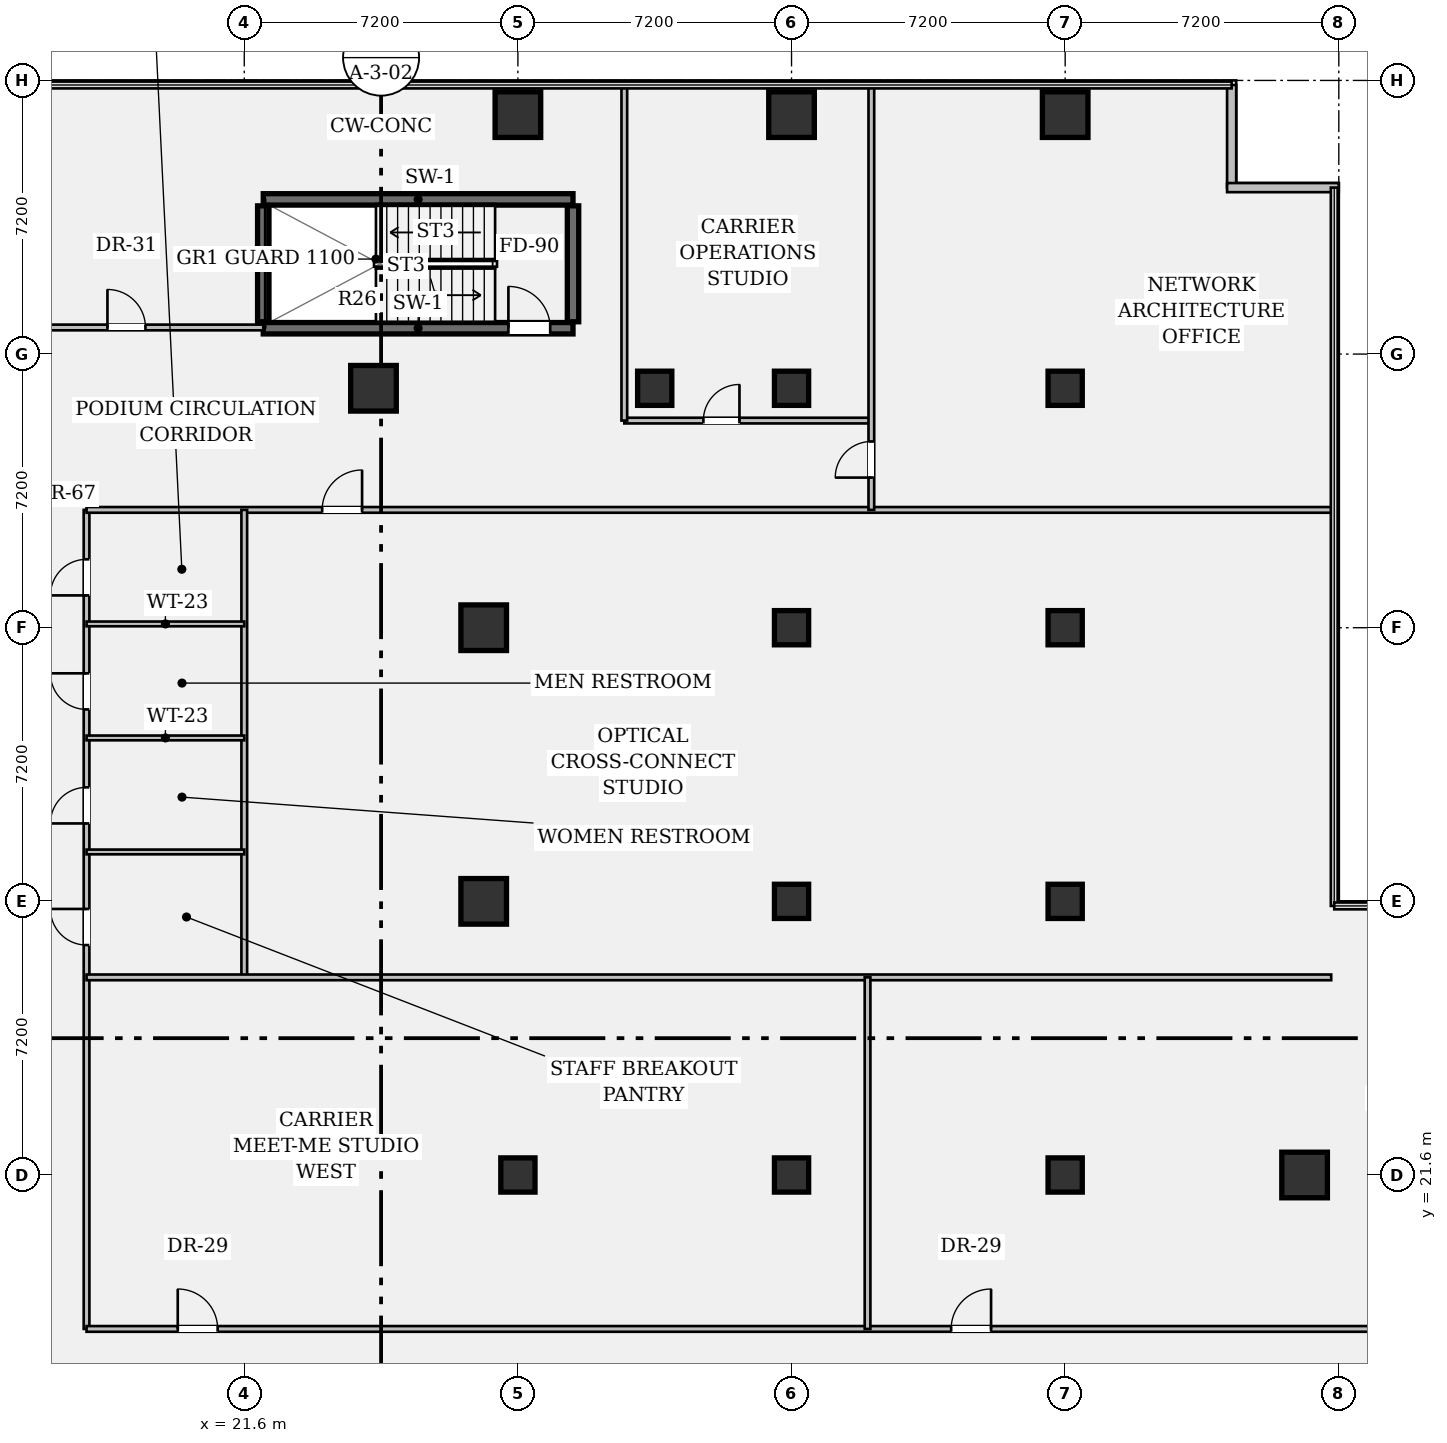
"""IFC4 building model, lengths in metres.
Left out: names, types, materials, properties, quantities, classifications, styles, units other than length and angle.
Written with IfcOpenShell. Run it as: python <this file> out.ifc"""

import sys

from ifc_helpers import new_model, si_unit, direction, frame, frame_2d, origin, origin_2d, place, context, subcontext, project, spatial, rectangle, hollow_rectangle, extrude, element, fill, save


model = new_model("IFC4")
c1 = context("Model", 3, precision=1e-05, world=origin(), true_north=direction((0.0, 1.0)))
c2 = subcontext(c1, "Body", "Model", "MODEL_VIEW")
j1 = project(units=[si_unit("LENGTHUNIT", "METRE"), si_unit("PLANEANGLEUNIT", "RADIAN")], contexts=[c1])
p1 = place(None, origin())
s1 = spatial("IfcSite", under=j1, at=p1, CompositionType="ELEMENT")
p2 = place(p1, origin())
s2 = spatial("IfcBuilding", under=s1, at=p2, CompositionType="ELEMENT")
p3 = place(p2, frame((0.0, 0.0, 13.65)))
s3 = spatial("IfcBuildingStorey", under=s2, at=p3, CompositionType="ELEMENT", Elevation=13.65)
p4 = place(p3, frame((22.1, 43.88, 0.0), z_axis=(0.0, 0.0, 1.0), x_axis=(1.0, 0.0, 0.0)))
e1 = element("IfcWall", 1, at=p4, inside=s3, PredefinedType="SHEAR", context=c2, shape_type="SweptSolid", body=[
    extrude(rectangle(XDim=8.15, YDim=0.3, at=frame_2d((4.075, 0.0))), origin(), (0.0, 0.0, 1.0), 3.91),
])
p5 = place(p4, frame((6.45, 0.0, 0.0)))
e2 = element("IfcOpeningElement", 2, at=p5, cuts=e1, PredefinedType="OPENING", context=c2, shape_type="SweptSolid", body=[
    extrude(rectangle(XDim=1.1, YDim=2.15, at=frame_2d((0.55, 1.075))), frame((0.0, 0.162, 0.0), z_axis=(0.0, -1.0, 0.0), x_axis=(1.0, 0.0, 0.0)), (0.0, 0.0, 1.0), 0.324),
])
p6 = place(p3, frame((22.1, 47.27, 0.0), z_axis=(0.0, 0.0, 1.0), x_axis=(1.0, 0.0, 0.0)))
e3 = element("IfcWall", 3, at=p6, inside=s3, PredefinedType="SHEAR", context=c2, shape_type="SweptSolid", body=[
    extrude(rectangle(XDim=8.15, YDim=0.3, at=frame_2d((4.075, 0.0))), origin(), (0.0, 0.0, 1.0), 3.91),
])
for number, where, z_axis, x_axis in (
    (4, (22.1, 44.05, 0.0), (0.0, 0.0, 1.0), (0.0, 1.0, 0.0)),
    (5, (30.25, 44.05, 0.0), (0.0, 0.0, 1.0), (0.0, 1.0, 0.0)),
):
    element("IfcWall", number, at=place(p3, frame(where, z_axis=z_axis, x_axis=x_axis)), inside=s3, PredefinedType="SHEAR", context=c2, shape_type="SweptSolid", body=[
        extrude(rectangle(XDim=3.05, YDim=0.3, at=frame_2d((1.525, 0.0))), origin(), (0.0, 0.0, 1.0), 3.91),
    ])
for number, where, z_axis, x_axis in (
    (6, (25.0, 42.3, 0.0), (0.0, 0.0, 1.0), (1.0, 0.0, 0.0)),
    (7, (27.9, 28.8, 0.0), (0.0, 0.0, 1.0), (1.0, 0.0, 0.0)),
    (8, (27.9, 36.0, 0.0), (0.0, 0.0, 1.0), (1.0, 0.0, 0.0)),
):
    element("IfcColumn", number, at=place(p3, frame(where, z_axis=z_axis, x_axis=x_axis)), inside=s3, PredefinedType="COLUMN", context=c2, shape_type="SweptSolid", body=[
        extrude(hollow_rectangle(XDim=1.2, YDim=1.2, WallThickness=0.075, at=origin_2d()), origin(), (0.0, 0.0, 1.0), 3.91),
    ])
p7 = place(p3, frame((28.8, 21.6, 0.0), z_axis=(0.0, 0.0, 1.0), x_axis=(1.0, 0.0, 0.0)))
e9 = element("IfcColumn", 9, at=p7, inside=s3, PredefinedType="COLUMN", context=c2, shape_type="SweptSolid", body=[
    extrude(rectangle(XDim=0.9, YDim=0.9, at=origin_2d()), origin(), (0.0, 0.0, 1.0), 3.91),
])
p8 = place(p3, frame((28.8, 49.5, 0.0), z_axis=(0.0, 0.0, 1.0), x_axis=(1.0, 0.0, 0.0)))
e10 = element("IfcColumn", 10, at=p8, inside=s3, PredefinedType="COLUMN", context=c2, shape_type="SweptSolid", body=[
    extrude(hollow_rectangle(XDim=1.2, YDim=1.2, WallThickness=0.075, at=origin_2d()), origin(), (0.0, 0.0, 1.0), 3.91),
])
for number, where, z_axis, x_axis in (
    (11, (32.4, 42.3, 0.0), (0.0, 0.0, 1.0), (1.0, 0.0, 0.0)),
    (12, (36.0, 21.6, 0.0), (0.0, 0.0, 1.0), (1.0, 0.0, 0.0)),
    (13, (36.0, 28.8, 0.0), (0.0, 0.0, 1.0), (1.0, 0.0, 0.0)),
    (14, (36.0, 36.0, 0.0), (0.0, 0.0, 1.0), (1.0, 0.0, 0.0)),
    (15, (36.0, 42.3, 0.0), (0.0, 0.0, 1.0), (1.0, 0.0, 0.0)),
):
    element("IfcColumn", number, at=place(p3, frame(where, z_axis=z_axis, x_axis=x_axis)), inside=s3, PredefinedType="COLUMN", context=c2, shape_type="SweptSolid", body=[
        extrude(rectangle(XDim=0.9, YDim=0.9, at=origin_2d()), origin(), (0.0, 0.0, 1.0), 3.91),
    ])
p9 = place(p3, frame((36.0, 49.5, 0.0), z_axis=(0.0, 0.0, 1.0), x_axis=(1.0, 0.0, 0.0)))
e16 = element("IfcColumn", 16, at=p9, inside=s3, PredefinedType="COLUMN", context=c2, shape_type="SweptSolid", body=[
    extrude(hollow_rectangle(XDim=1.2, YDim=1.2, WallThickness=0.075, at=origin_2d()), origin(), (0.0, 0.0, 1.0), 3.91),
])
for number, where, z_axis, x_axis in (
    (17, (43.2, 21.6, 0.0), (0.0, 0.0, 1.0), (1.0, 0.0, 0.0)),
    (18, (43.2, 28.8, 0.0), (0.0, 0.0, 1.0), (1.0, 0.0, 0.0)),
    (19, (43.2, 36.0, 0.0), (0.0, 0.0, 1.0), (1.0, 0.0, 0.0)),
    (20, (43.2, 42.3, 0.0), (0.0, 0.0, 1.0), (1.0, 0.0, 0.0)),
):
    element("IfcColumn", number, at=place(p3, frame(where, z_axis=z_axis, x_axis=x_axis)), inside=s3, PredefinedType="COLUMN", context=c2, shape_type="SweptSolid", body=[
        extrude(rectangle(XDim=0.9, YDim=0.9, at=origin_2d()), origin(), (0.0, 0.0, 1.0), 3.91),
    ])
for number, where, z_axis, x_axis in (
    (21, (43.2, 49.5, 0.0), (0.0, 0.0, 1.0), (1.0, 0.0, 0.0)),
    (22, (49.5, 21.6, 0.0), (0.0, 0.0, 1.0), (1.0, 0.0, 0.0)),
):
    element("IfcColumn", number, at=place(p3, frame(where, z_axis=z_axis, x_axis=x_axis)), inside=s3, PredefinedType="COLUMN", context=c2, shape_type="SweptSolid", body=[
        extrude(hollow_rectangle(XDim=1.2, YDim=1.2, WallThickness=0.075, at=origin_2d()), origin(), (0.0, 0.0, 1.0), 3.91),
    ])
p10 = place(p3, frame((47.58, 50.28, 0.0), z_axis=(0.0, 0.0, 1.0), x_axis=(0.0, -1.0, 0.0)))
e23 = element("IfcWall", 23, at=p10, inside=s3, PredefinedType="STANDARD", context=c2, shape_type="SweptSolid", body=[
    extrude(rectangle(XDim=2.7, YDim=0.24, at=frame_2d((1.35, 0.0))), origin(), (0.0, 0.0, 1.0), 3.91),
])
p11 = place(p3, frame((47.46, 47.58, 0.0), z_axis=(0.0, 0.0, 1.0), x_axis=(1.0, 0.0, 0.0)))
e24 = element("IfcWall", 24, at=p11, inside=s3, PredefinedType="STANDARD", context=c2, shape_type="SweptSolid", body=[
    extrude(rectangle(XDim=2.94, YDim=0.24, at=frame_2d((1.47, 0.0))), origin(), (0.0, 0.0, 1.0), 3.91),
])
p12 = place(p3, frame((17.45, 17.55, 0.0), z_axis=(0.0, 0.0, 1.0), x_axis=(0.0, 1.0, 0.0)))
e25 = element("IfcWall", 25, at=p12, inside=s3, PredefinedType="PARTITIONING", context=c2, shape_type="SweptSolid", body=[
    extrude(rectangle(XDim=21.55, YDim=0.15, at=frame_2d((10.775, 0.0))), origin(), (0.0, 0.0, 1.0), 2.968),
])
p13 = place(p12, frame((19.3, 0.0, 0.0)))
e26 = element("IfcOpeningElement", 26, at=p13, cuts=e25, PredefinedType="OPENING", context=c2, shape_type="SweptSolid", body=[
    extrude(rectangle(XDim=0.95, YDim=2.15, at=frame_2d((0.475, 1.075))), frame((0.0, 0.087, 0.0), z_axis=(0.0, -1.0, 0.0), x_axis=(1.0, 0.0, 0.0)), (0.0, 0.0, 1.0), 0.174),
])
p14 = place(p12, frame((16.3, 0.0, 0.0)))
e27 = element("IfcOpeningElement", 27, at=p14, cuts=e25, PredefinedType="OPENING", context=c2, shape_type="SweptSolid", body=[
    extrude(rectangle(XDim=0.95, YDim=2.15, at=frame_2d((0.475, 1.075))), frame((0.0, 0.087, 0.0), z_axis=(0.0, -1.0, 0.0), x_axis=(1.0, 0.0, 0.0)), (0.0, 0.0, 1.0), 0.174),
])
p15 = place(p12, frame((13.3, 0.0, 0.0)))
e28 = element("IfcOpeningElement", 28, at=p15, cuts=e25, PredefinedType="OPENING", context=c2, shape_type="SweptSolid", body=[
    extrude(rectangle(XDim=0.95, YDim=2.15, at=frame_2d((0.475, 1.075))), frame((0.0, 0.087, 0.0), z_axis=(0.0, -1.0, 0.0), x_axis=(1.0, 0.0, 0.0)), (0.0, 0.0, 1.0), 0.174),
])
p16 = place(p12, frame((10.1, 0.0, 0.0)))
e29 = element("IfcOpeningElement", 29, at=p16, cuts=e25, PredefinedType="OPENING", context=c2, shape_type="SweptSolid", body=[
    extrude(rectangle(XDim=0.95, YDim=2.15, at=frame_2d((0.475, 1.075))), frame((0.0, 0.087, 0.0), z_axis=(0.0, -1.0, 0.0), x_axis=(1.0, 0.0, 0.0)), (0.0, 0.0, 1.0), 0.174),
])
p17 = place(p3, frame((14.4, 43.9, 0.0), z_axis=(0.0, 0.0, 1.0), x_axis=(1.0, 0.0, 0.0)))
e30 = element("IfcWall", 30, at=p17, inside=s3, PredefinedType="PARTITIONING", context=c2, shape_type="SweptSolid", body=[
    extrude(rectangle(XDim=7.7, YDim=0.15, at=frame_2d((3.85, 0.0))), origin(), (0.0, 0.0, 1.0), 2.968),
])
p18 = place(p17, frame((3.6, 0.0, 0.0)))
e31 = element("IfcOpeningElement", 31, at=p18, cuts=e30, PredefinedType="OPENING", context=c2, shape_type="SweptSolid", body=[
    extrude(rectangle(XDim=1.0, YDim=2.15, at=frame_2d((0.5, 1.075))), frame((0.0, 0.087, 0.0), z_axis=(0.0, -1.0, 0.0), x_axis=(1.0, 0.0, 0.0)), (0.0, 0.0, 1.0), 0.174),
])
p19 = place(p3, frame((31.6, 41.45, 0.0), z_axis=(0.0, 0.0, 1.0), x_axis=(1.0, 0.0, 0.0)))
e32 = element("IfcWall", 32, at=p19, inside=s3, PredefinedType="PARTITIONING", context=c2, shape_type="SweptSolid", body=[
    extrude(rectangle(XDim=6.5, YDim=0.15, at=frame_2d((3.25, 0.0))), origin(), (0.0, 0.0, 1.0), 2.968),
])
p20 = place(p19, frame((2.08, 0.0, 0.0)))
e33 = element("IfcOpeningElement", 33, at=p20, cuts=e32, PredefinedType="OPENING", context=c2, shape_type="SweptSolid", body=[
    extrude(rectangle(XDim=0.95, YDim=2.15, at=frame_2d((0.475, 1.075))), frame((0.0, 0.087, 0.0), z_axis=(0.0, -1.0, 0.0), x_axis=(1.0, 0.0, 0.0)), (0.0, 0.0, 1.0), 0.174),
])
p21 = place(p3, frame((17.45, 39.1, 0.0), z_axis=(0.0, 0.0, 1.0), x_axis=(1.0, 0.0, 0.0)))
e34 = element("IfcWall", 34, at=p21, inside=s3, PredefinedType="PARTITIONING", context=c2, shape_type="SweptSolid", body=[
    extrude(rectangle(XDim=32.83, YDim=0.15, at=frame_2d((16.415, 0.0))), origin(), (0.0, 0.0, 1.0), 2.968),
])
p22 = place(p21, frame((6.2, 0.0, 0.0)))
e35 = element("IfcOpeningElement", 35, at=p22, cuts=e34, PredefinedType="OPENING", context=c2, shape_type="SweptSolid", body=[
    extrude(rectangle(XDim=1.05, YDim=2.15, at=frame_2d((0.525, 1.075))), frame((0.0, 0.087, 0.0), z_axis=(0.0, -1.0, 0.0), x_axis=(1.0, 0.0, 0.0)), (0.0, 0.0, 1.0), 0.174),
])
p23 = place(p3, frame((31.6, 41.45, 0.0), z_axis=(0.0, 0.0, 1.0), x_axis=(0.0, 1.0, 0.0)))
e36 = element("IfcWall", 36, at=p23, inside=s3, PredefinedType="PARTITIONING", context=c2, shape_type="SweptSolid", body=[
    extrude(rectangle(XDim=8.83, YDim=0.15, at=frame_2d((4.415, 0.0))), origin(), (0.0, 0.0, 1.0), 2.968),
])
p24 = place(p3, frame((38.1, 39.1, 0.0), z_axis=(0.0, 0.0, 1.0), x_axis=(0.0, 1.0, 0.0)))
e37 = element("IfcWall", 37, at=p24, inside=s3, PredefinedType="PARTITIONING", context=c2, shape_type="SweptSolid", body=[
    extrude(rectangle(XDim=11.18, YDim=0.15, at=frame_2d((5.59, 0.0))), origin(), (0.0, 0.0, 1.0), 2.968),
])
p25 = place(p24, frame((0.85, 0.0, 0.0)))
e38 = element("IfcOpeningElement", 38, at=p25, cuts=e37, PredefinedType="OPENING", context=c2, shape_type="SweptSolid", body=[
    extrude(rectangle(XDim=0.95, YDim=2.15, at=frame_2d((0.475, 1.075))), frame((0.0, 0.087, 0.0), z_axis=(0.0, -1.0, 0.0), x_axis=(1.0, 0.0, 0.0)), (0.0, 0.0, 1.0), 0.174),
])
p26 = place(p3, frame((17.45, 17.55, 0.0), z_axis=(0.0, 0.0, 1.0), x_axis=(1.0, 0.0, 0.0)))
e39 = element("IfcWall", 39, at=p26, inside=s3, PredefinedType="PARTITIONING", context=c2, shape_type="SweptSolid", body=[
    extrude(rectangle(XDim=68.83, YDim=0.15, at=frame_2d((34.415, 0.0))), origin(), (0.0, 0.0, 1.0), 2.968),
])
p27 = place(p26, frame((2.4, 0.0, 0.0)))
e40 = element("IfcOpeningElement", 40, at=p27, cuts=e39, PredefinedType="OPENING", context=c2, shape_type="SweptSolid", body=[
    extrude(rectangle(XDim=1.05, YDim=2.15, at=frame_2d((0.525, 1.075))), frame((0.0, 0.087, 0.0), z_axis=(0.0, -1.0, 0.0), x_axis=(1.0, 0.0, 0.0)), (0.0, 0.0, 1.0), 0.174),
])
p28 = place(p26, frame((22.75, 0.0, 0.0)))
e41 = element("IfcOpeningElement", 41, at=p28, cuts=e39, PredefinedType="OPENING", context=c2, shape_type="SweptSolid", body=[
    extrude(rectangle(XDim=1.05, YDim=2.15, at=frame_2d((0.525, 1.075))), frame((0.0, 0.087, 0.0), z_axis=(0.0, -1.0, 0.0), x_axis=(1.0, 0.0, 0.0)), (0.0, 0.0, 1.0), 0.174),
])
p29 = place(p26, frame((46.75, 0.0, 0.0)))
e42 = element("IfcOpeningElement", 42, at=p29, cuts=e39, PredefinedType="OPENING", context=c2, shape_type="SweptSolid", body=[
    extrude(rectangle(XDim=1.05, YDim=2.15, at=frame_2d((0.525, 1.075))), frame((0.0, 0.087, 0.0), z_axis=(0.0, -1.0, 0.0), x_axis=(1.0, 0.0, 0.0)), (0.0, 0.0, 1.0), 0.174),
])
p30 = place(p3, frame((21.6, 26.8, 0.0), z_axis=(0.0, 0.0, 1.0), x_axis=(0.0, 1.0, 0.0)))
e43 = element("IfcWall", 43, at=p30, inside=s3, PredefinedType="PARTITIONING", context=c2, shape_type="SweptSolid", body=[
    extrude(rectangle(XDim=12.3, YDim=0.15, at=frame_2d((6.15, 0.0))), origin(), (0.0, 0.0, 1.0), 2.968),
])
p31 = place(p3, frame((17.45, 36.1, 0.0), z_axis=(0.0, 0.0, 1.0), x_axis=(1.0, 0.0, 0.0)))
e44 = element("IfcWall", 44, at=p31, inside=s3, PredefinedType="PARTITIONING", context=c2, shape_type="SweptSolid", body=[
    extrude(rectangle(XDim=4.15, YDim=0.125, at=frame_2d((2.075, 0.0))), origin(), (0.0, 0.0, 1.0), 2.968),
])
for number, where, z_axis, x_axis in (
    (45, (17.45, 33.1, 0.0), (0.0, 0.0, 1.0), (1.0, 0.0, 0.0)),
    (46, (17.45, 30.1, 0.0), (0.0, 0.0, 1.0), (1.0, 0.0, 0.0)),
):
    element("IfcWall", number, at=place(p3, frame(where, z_axis=z_axis, x_axis=x_axis)), inside=s3, PredefinedType="PARTITIONING", context=c2, shape_type="SweptSolid", body=[
        extrude(rectangle(XDim=4.15, YDim=0.125, at=frame_2d((2.075, 0.0))), origin(), (0.0, 0.0, 1.0), 3.428),
    ])
p32 = place(p3, frame((17.45, 26.8, 0.0), z_axis=(0.0, 0.0, 1.0), x_axis=(1.0, 0.0, 0.0)))
e47 = element("IfcWall", 47, at=p32, inside=s3, PredefinedType="PARTITIONING", context=c2, shape_type="SweptSolid", body=[
    extrude(rectangle(XDim=32.75, YDim=0.15, at=frame_2d((16.375, 0.0))), origin(), (0.0, 0.0, 1.0), 2.968),
])
p33 = place(p3, frame((38.0, 17.55, 0.0), z_axis=(0.0, 0.0, 1.0), x_axis=(0.0, 1.0, 0.0)))
e48 = element("IfcWall", 48, at=p33, inside=s3, PredefinedType="PARTITIONING", context=c2, shape_type="SweptSolid", body=[
    extrude(rectangle(XDim=9.25, YDim=0.15, at=frame_2d((4.625, 0.0))), origin(), (0.0, 0.0, 1.0), 2.968),
])
p34 = place(p5, origin())
e49 = element("IfcDoor", 49, at=p34, inside=s3, OperationType="SINGLE_SWING_LEFT", PredefinedType="DOOR", context=c2, shape_type="SweptSolid", body=[
    extrude(rectangle(XDim=1.1, YDim=2.15, at=frame_2d((0.55, 1.075))), frame((0.0, 0.025, 0.0), z_axis=(0.0, -1.0, 0.0), x_axis=(1.0, 0.0, 0.0)), (0.0, 0.0, 1.0), 0.05),
])
fill(e2, e49)
p35 = place(p13, origin())
e50 = element("IfcDoor", 50, at=p35, inside=s3, OperationType="SINGLE_SWING_LEFT", PredefinedType="DOOR", context=c2, shape_type="SweptSolid", body=[
    extrude(rectangle(XDim=0.95, YDim=2.15, at=frame_2d((0.475, 1.075))), frame((0.0, 0.025, 0.0), z_axis=(0.0, -1.0, 0.0), x_axis=(1.0, 0.0, 0.0)), (0.0, 0.0, 1.0), 0.05),
])
fill(e26, e50)
p36 = place(p14, origin())
e51 = element("IfcDoor", 51, at=p36, inside=s3, OperationType="SINGLE_SWING_RIGHT", PredefinedType="DOOR", context=c2, shape_type="SweptSolid", body=[
    extrude(rectangle(XDim=0.95, YDim=2.15, at=frame_2d((0.475, 1.075))), frame((0.0, 0.025, 0.0), z_axis=(0.0, -1.0, 0.0), x_axis=(1.0, 0.0, 0.0)), (0.0, 0.0, 1.0), 0.05),
])
fill(e27, e51)
p37 = place(p15, origin())
e52 = element("IfcDoor", 52, at=p37, inside=s3, OperationType="SINGLE_SWING_LEFT", PredefinedType="DOOR", context=c2, shape_type="SweptSolid", body=[
    extrude(rectangle(XDim=0.95, YDim=2.15, at=frame_2d((0.475, 1.075))), frame((0.0, 0.025, 0.0), z_axis=(0.0, -1.0, 0.0), x_axis=(1.0, 0.0, 0.0)), (0.0, 0.0, 1.0), 0.05),
])
fill(e28, e52)
p38 = place(p16, origin())
e53 = element("IfcDoor", 53, at=p38, inside=s3, OperationType="SINGLE_SWING_RIGHT", PredefinedType="DOOR", context=c2, shape_type="SweptSolid", body=[
    extrude(rectangle(XDim=0.95, YDim=2.15, at=frame_2d((0.475, 1.075))), frame((0.0, 0.025, 0.0), z_axis=(0.0, -1.0, 0.0), x_axis=(1.0, 0.0, 0.0)), (0.0, 0.0, 1.0), 0.05),
])
fill(e29, e53)
p39 = place(p20, origin())
e54 = element("IfcDoor", 54, at=p39, inside=s3, OperationType="SINGLE_SWING_RIGHT", PredefinedType="DOOR", context=c2, shape_type="SweptSolid", body=[
    extrude(rectangle(XDim=0.95, YDim=2.15, at=frame_2d((0.475, 1.075))), frame((0.0, 0.025, 0.0), z_axis=(0.0, -1.0, 0.0), x_axis=(1.0, 0.0, 0.0)), (0.0, 0.0, 1.0), 0.05),
])
fill(e33, e54)
p40 = place(p27, origin())
e55 = element("IfcDoor", 55, at=p40, inside=s3, OperationType="SINGLE_SWING_LEFT", PredefinedType="DOOR", context=c2, shape_type="SweptSolid", body=[
    extrude(rectangle(XDim=1.05, YDim=2.15, at=frame_2d((0.525, 1.075))), frame((0.0, 0.025, 0.0), z_axis=(0.0, -1.0, 0.0), x_axis=(1.0, 0.0, 0.0)), (0.0, 0.0, 1.0), 0.05),
])
fill(e40, e55)
p41 = place(p28, origin())
e56 = element("IfcDoor", 56, at=p41, inside=s3, OperationType="SINGLE_SWING_RIGHT", PredefinedType="DOOR", context=c2, shape_type="SweptSolid", body=[
    extrude(rectangle(XDim=1.05, YDim=2.15, at=frame_2d((0.525, 1.075))), frame((0.0, 0.025, 0.0), z_axis=(0.0, -1.0, 0.0), x_axis=(1.0, 0.0, 0.0)), (0.0, 0.0, 1.0), 0.05),
])
fill(e41, e56)
p42 = place(p22, origin())
e57 = element("IfcDoor", 57, at=p42, inside=s3, OperationType="SINGLE_SWING_RIGHT", PredefinedType="DOOR", context=c2, shape_type="SweptSolid", body=[
    extrude(rectangle(XDim=1.05, YDim=2.15, at=frame_2d((0.525, 1.075))), frame((0.0, 0.025, 0.0), z_axis=(0.0, -1.0, 0.0), x_axis=(1.0, 0.0, 0.0)), (0.0, 0.0, 1.0), 0.05),
])
fill(e35, e57)
p43 = place(p25, origin())
e58 = element("IfcDoor", 58, at=p43, inside=s3, OperationType="SINGLE_SWING_LEFT", PredefinedType="DOOR", context=c2, shape_type="SweptSolid", body=[
    extrude(rectangle(XDim=0.95, YDim=2.15, at=frame_2d((0.475, 1.075))), frame((0.0, 0.025, 0.0), z_axis=(0.0, -1.0, 0.0), x_axis=(1.0, 0.0, 0.0)), (0.0, 0.0, 1.0), 0.05),
])
fill(e38, e58)
p44 = place(p18, origin())
e59 = element("IfcDoor", 59, at=p44, inside=s3, OperationType="SINGLE_SWING_LEFT", PredefinedType="DOOR", context=c2, shape_type="SweptSolid", body=[
    extrude(rectangle(XDim=1.0, YDim=2.15, at=frame_2d((0.5, 1.075))), frame((0.0, 0.025, 0.0), z_axis=(0.0, -1.0, 0.0), x_axis=(1.0, 0.0, 0.0)), (0.0, 0.0, 1.0), 0.05),
])
fill(e31, e59)
save(model, sys.argv[1])
